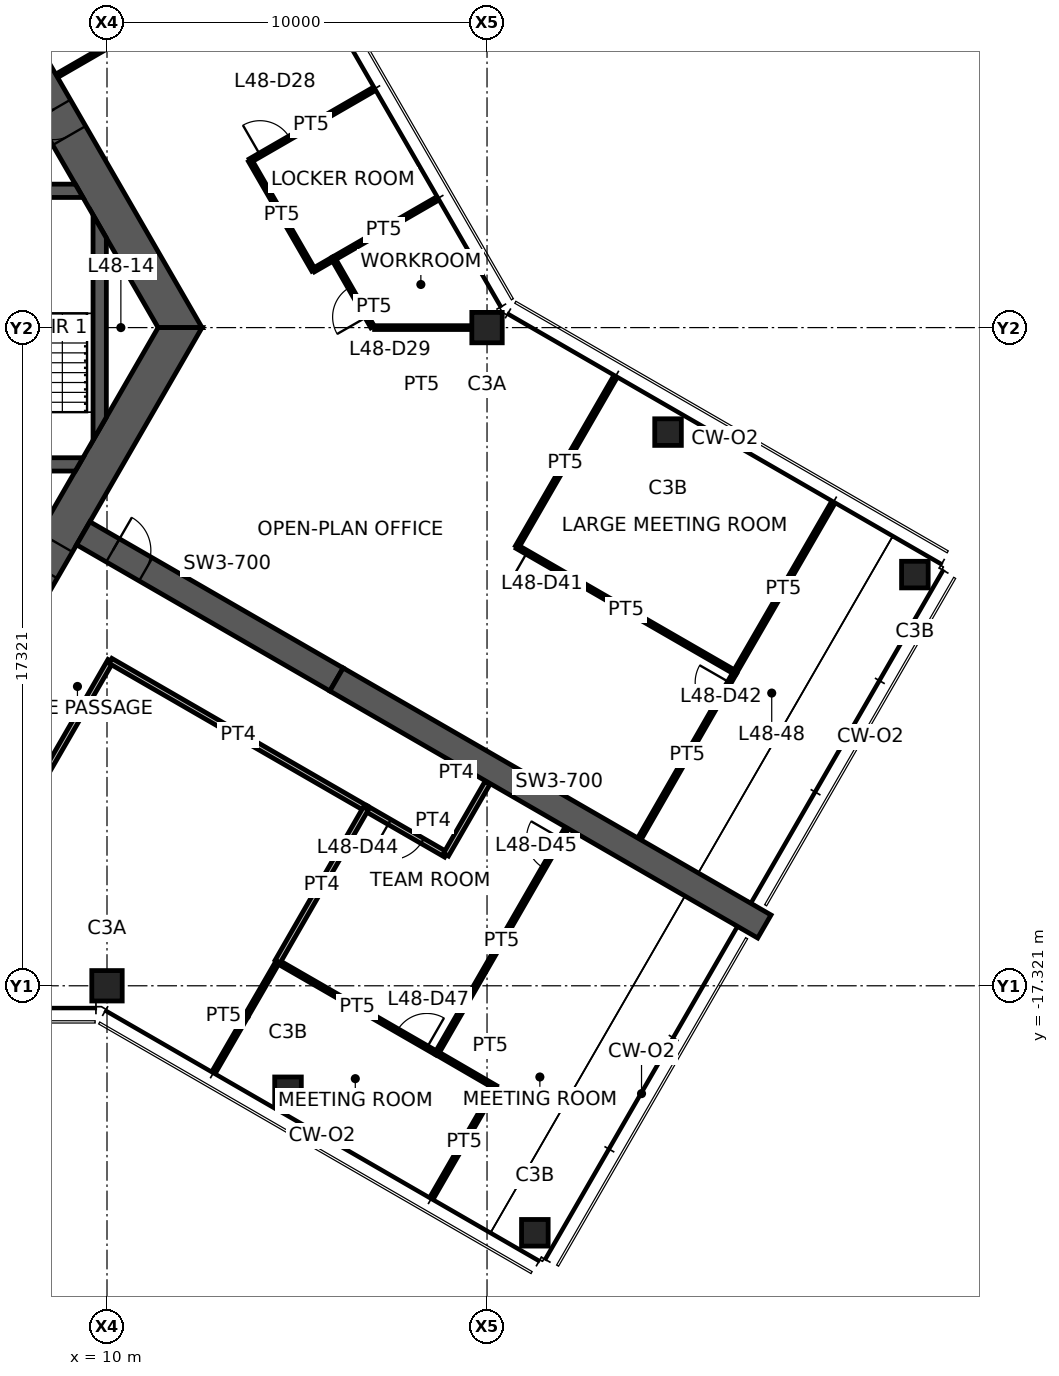
"""IFC4 building model, lengths in metres.
Left out: names, types, materials, properties, quantities, classifications, styles, units other than length and angle.
Written with IfcOpenShell. Run it as: python <this file> out.ifc"""

import sys

from ifc_helpers import new_model, si_unit, direction, frame, frame_2d, origin, origin_2d, place, context, subcontext, project, spatial, polyline, rectangle, hollow_rectangle, outline, extrude, element, fill, save


model = new_model("IFC4")
c1 = context("Model", 3, precision=1e-05, world=origin(), true_north=direction((0.0, 1.0)))
c2 = subcontext(c1, "Body", "Model", "MODEL_VIEW")
j1 = project(units=[si_unit("LENGTHUNIT", "METRE"), si_unit("PLANEANGLEUNIT", "RADIAN")], contexts=[c1])
p1 = place(None, origin())
s1 = spatial("IfcSite", under=j1, at=p1, CompositionType="ELEMENT")
p2 = place(p1, origin())
s2 = spatial("IfcBuilding", under=s1, at=p2, CompositionType="ELEMENT")
p3 = place(p2, frame((0.0, 0.0, 191.6)))
s3 = spatial("IfcBuildingStorey", under=s2, at=p3, CompositionType="ELEMENT", Elevation=191.6)
for number, where, z_axis, x_axis in (
    (1, (20.0, 0.0, 0.0), (0.0, 0.0, 1.0), (1.0, 0.0, 0.0)),
    (2, (10.0, -17.321, 0.0), (0.0, 0.0, 1.0), (1.0, 0.0, 0.0)),
):
    element("IfcColumn", number, at=place(p3, frame(where, z_axis=z_axis, x_axis=x_axis)), inside=s3, PredefinedType="COLUMN", context=c2, shape_type="SweptSolid", body=[
        extrude(hollow_rectangle(XDim=0.8, YDim=0.8, WallThickness=0.045, at=origin_2d()), origin(), (0.0, 0.0, 1.0), 3.9),
    ])
for number, where, z_axis, x_axis in (
    (3, (14.763, -20.071, 0.0), (0.0, 0.0, 1.0), (1.0, 0.0, 0.0)),
    (4, (21.258, -23.821, 0.0), (0.0, 0.0, 1.0), (1.0, 0.0, 0.0)),
    (5, (24.763, -2.75, 0.0), (0.0, 0.0, 1.0), (1.0, 0.0, 0.0)),
    (6, (31.258, -6.5, 0.0), (0.0, 0.0, 1.0), (1.0, 0.0, 0.0)),
):
    element("IfcColumn", number, at=place(p3, frame(where, z_axis=z_axis, x_axis=x_axis)), inside=s3, PredefinedType="COLUMN", context=c2, shape_type="SweptSolid", body=[
        extrude(hollow_rectangle(XDim=0.7, YDim=0.7, WallThickness=0.036, at=origin_2d()), origin(), (0.0, 0.0, 1.0), 3.9),
    ])
p4 = place(p3, frame((11.922, 0.0, 0.0), z_axis=(0.0, 0.0, 1.0), x_axis=(-0.500004296715, 0.866022923061, 0.0)))
e7 = element("IfcWall", 7, at=p4, inside=s3, PredefinedType="SHEAR", context=c2, shape_type="SweptSolid", body=[
    extrude(outline(polyline([(-0.289, -0.5), (5.835, -0.5), (6.635, -0.5), (12.211, -0.5), (11.634, 0.5), (6.635, 0.5), (5.835, 0.5), (0.289, 0.5), (-0.289, -0.5)])), origin(), (0.0, 0.0, 1.0), 3.9),
])
p5 = place(p4, frame((5.835, 0.0, 0.0)))
e8 = element("IfcOpeningElement", 8, at=p5, cuts=e7, PredefinedType="OPENING", context=c2, shape_type="SweptSolid", body=[
    extrude(rectangle(XDim=0.8, YDim=2.1, at=frame_2d((0.4, 1.05))), frame((0.0, 0.51, 0.0), z_axis=(0.0, -1.0, 0.0), x_axis=(1.0, 0.0, 0.0)), (0.0, 0.0, 1.0), 1.02),
])
p6 = place(p3, frame((5.961, -10.325, 0.0), z_axis=(0.0, 0.0, 1.0), x_axis=(0.500004296715, 0.866022923061, 0.0)))
e9 = element("IfcWall", 9, at=p6, inside=s3, PredefinedType="SHEAR", context=c2, shape_type="SweptSolid", body=[
    extrude(outline(polyline([(-0.289, -0.5), (4.594, -0.5), (5.394, -0.5), (12.211, -0.5), (11.634, 0.5), (5.394, 0.5), (4.594, 0.5), (0.289, 0.5), (-0.289, -0.5)])), origin(), (0.0, 0.0, 1.0), 3.9),
])
p7 = place(p6, frame((4.594, 0.0, 0.0)))
e10 = element("IfcOpeningElement", 10, at=p7, cuts=e9, PredefinedType="OPENING", context=c2, shape_type="SweptSolid", body=[
    extrude(rectangle(XDim=0.8, YDim=2.1, at=frame_2d((0.4, 1.05))), frame((0.0, 0.51, 0.0), z_axis=(0.0, -1.0, 0.0), x_axis=(1.0, 0.0, 0.0)), (0.0, 0.0, 1.0), 1.02),
])
p8 = place(p3, frame((9.375, -5.413, 0.0), z_axis=(0.0, 0.0, 1.0), x_axis=(0.866032377459, -0.499987921047, 0.0)))
e11 = element("IfcWall", 11, at=p8, inside=s3, PredefinedType="SHEAR", context=c2, shape_type="SweptSolid", body=[
    extrude(rectangle(XDim=7.696, YDim=0.7, at=frame_2d((3.848, 0.0))), origin(), (0.0, 0.0, 1.0), 3.9),
])
p9 = place(p8, frame((0.9, 0.0, 0.0)))
e12 = element("IfcOpeningElement", 12, at=p9, cuts=e11, PredefinedType="OPENING", context=c2, shape_type="SweptSolid", body=[
    extrude(rectangle(XDim=1.0, YDim=2.1, at=frame_2d((0.5, 1.05))), frame((0.0, 0.36, 0.0), z_axis=(0.0, -1.0, 0.0), x_axis=(1.0, 0.0, 0.0)), (0.0, 0.0, 1.0), 0.72),
])
p10 = place(p3, frame((16.039, -9.26, 0.0), z_axis=(0.0, 0.0, 1.0), x_axis=(0.866024837091, -0.50000098154, 0.0)))
e13 = element("IfcWall", 13, at=p10, inside=s3, PredefinedType="SHEAR", context=c2, shape_type="SweptSolid", body=[
    extrude(rectangle(XDim=13.0, YDim=0.7, at=frame_2d((6.5, 0.0))), origin(), (0.0, 0.0, 1.0), 3.9),
])
p11 = place(p3, frame((1.425, 3.6, 0.0), z_axis=(0.0, 0.0, 1.0), x_axis=(1.0, 0.0, 0.0)))
e14 = element("IfcWall", 14, at=p11, inside=s3, PredefinedType="SHEAR", context=c2, shape_type="SweptSolid", body=[
    extrude(outline(polyline([(0.0, -0.175), (3.425, -0.175), (4.725, -0.175), (7.942, -0.175), (7.74, 0.175), (4.725, 0.175), (3.425, 0.175), (0.0, 0.175), (0.0, -0.175)])), origin(), (0.0, 0.0, 1.0), 3.9),
])
p12 = place(p11, frame((3.425, 0.0, 0.0)))
e15 = element("IfcOpeningElement", 15, at=p12, cuts=e14, PredefinedType="OPENING", context=c2, shape_type="SweptSolid", body=[
    extrude(rectangle(XDim=1.3, YDim=2.1, at=frame_2d((0.65, 1.05))), frame((0.0, 0.185, 0.0), z_axis=(0.0, -1.0, 0.0), x_axis=(1.0, 0.0, 0.0)), (0.0, 0.0, 1.0), 0.37),
])
p13 = place(p3, frame((1.425, -3.6, 0.0), z_axis=(0.0, 0.0, 1.0), x_axis=(1.0, 0.0, 0.0)))
e16 = element("IfcWall", 16, at=p13, inside=s3, PredefinedType="SHEAR", context=c2, shape_type="SweptSolid", body=[
    extrude(outline(polyline([(0.0, -0.175), (1.075, -0.175), (2.175, -0.175), (7.74, -0.175), (7.942, 0.175), (2.175, 0.175), (1.075, 0.175), (0.0, 0.175), (0.0, -0.175)])), origin(), (0.0, 0.0, 1.0), 3.9),
])
p14 = place(p13, frame((1.075, 0.0, 0.0)))
e17 = element("IfcOpeningElement", 17, at=p14, cuts=e16, PredefinedType="OPENING", context=c2, shape_type="SweptSolid", body=[
    extrude(rectangle(XDim=1.1, YDim=2.1, at=frame_2d((0.55, 1.05))), frame((0.0, 0.185, 0.0), z_axis=(0.0, -1.0, 0.0), x_axis=(1.0, 0.0, 0.0)), (0.0, 0.0, 1.0), 0.37),
])
p15 = place(p3, frame((9.808, -2.662, 0.0), z_axis=(0.0, 0.0, 1.0), x_axis=(0.0, 1.0, 0.0)))
e18 = element("IfcWall", 18, at=p15, inside=s3, PredefinedType="SHEAR", context=c2, shape_type="SweptSolid", body=[
    extrude(outline(polyline([(0.303, -0.175), (5.021, -0.175), (5.628, 0.175), (-0.303, 0.175), (0.303, -0.175)])), origin(), (0.0, 0.0, 1.0), 3.9),
])
p16 = place(p3, frame((11.1, 8.025, 0.0), z_axis=(0.0, 0.0, 1.0), x_axis=(-0.866056901187, -0.49994544093, 0.0)))
e19 = element("IfcWall", 19, at=p16, inside=s3, PredefinedType="PARTITIONING", context=c2, shape_type="SweptSolid", body=[
    extrude(rectangle(XDim=2.78, YDim=0.1, at=frame_2d((1.39, 0.0))), origin(), (0.0, 0.0, 1.0), 2.95),
])
p17 = place(p3, frame((18.62, 3.351, 0.0), z_axis=(0.0, 0.0, 1.0), x_axis=(-0.866043267704, -0.499969057507, 0.0)))
e20 = element("IfcWall", 20, at=p17, inside=s3, PredefinedType="PARTITIONING", context=c2, shape_type="SweptSolid", body=[
    extrude(rectangle(XDim=3.085, YDim=0.1, at=frame_2d((1.542, 0.0))), origin(), (0.0, 0.0, 1.0), 2.95),
])
p18 = place(p3, frame((13.767, 4.395, 0.0), z_axis=(0.0, 0.0, 1.0), x_axis=(0.866028673236, 0.499994337101, 0.0)))
e21 = element("IfcWall", 21, at=p18, inside=s3, PredefinedType="PARTITIONING", context=c2, shape_type="SweptSolid", body=[
    extrude(rectangle(XDim=3.705, YDim=0.1, at=frame_2d((1.853, 0.0))), origin(), (0.0, 0.0, 1.0), 2.95),
])
p19 = place(p18, frame((0.3, 0.0, 0.0)))
e22 = element("IfcOpeningElement", 22, at=p19, cuts=e21, PredefinedType="OPENING", context=c2, shape_type="SweptSolid", body=[
    extrude(rectangle(XDim=0.9, YDim=2.1, at=frame_2d((0.45, 1.05))), frame((0.0, 0.06, 0.0), z_axis=(0.0, -1.0, 0.0), x_axis=(1.0, 0.0, 0.0)), (0.0, 0.0, 1.0), 0.12),
])
p20 = place(p3, frame((15.433, 1.51, 0.0), z_axis=(0.0, 0.0, 1.0), x_axis=(-0.500001606164, 0.866024476463, 0.0)))
e23 = element("IfcWall", 23, at=p20, inside=s3, PredefinedType="PARTITIONING", context=c2, shape_type="SweptSolid", body=[
    extrude(rectangle(XDim=3.331, YDim=0.1, at=frame_2d((1.666, 0.0))), origin(), (0.0, 0.0, 1.0), 2.95),
])
p21 = place(p3, frame((15.956, 1.813, 0.0), z_axis=(0.0, 0.0, 1.0), x_axis=(-0.865997239347, -0.500048779063, 0.0)))
e24 = element("IfcWall", 24, at=p21, inside=s3, PredefinedType="PARTITIONING", context=c2, shape_type="SweptSolid", body=[
    extrude(rectangle(XDim=0.604, YDim=0.1, at=frame_2d((0.302, 0.0))), origin(), (0.0, 0.0, 1.0), 2.95),
])
p22 = place(p3, frame((16.986, 0.02, 0.0), z_axis=(0.0, 0.0, 1.0), x_axis=(-0.498096123952, 0.867121820337, 0.0)))
e25 = element("IfcWall", 25, at=p22, inside=s3, PredefinedType="PARTITIONING", context=c2, shape_type="SweptSolid", body=[
    extrude(rectangle(XDim=2.067, YDim=0.1, at=frame_2d((1.034, 0.0))), origin(), (0.0, 0.0, 1.0), 2.95),
])
p23 = place(p22, frame((0.3, 0.0, 0.0)))
e26 = element("IfcOpeningElement", 26, at=p23, cuts=e25, PredefinedType="OPENING", context=c2, shape_type="SweptSolid", body=[
    extrude(rectangle(XDim=0.9, YDim=2.1, at=frame_2d((0.45, 1.05))), frame((0.0, 0.06, 0.0), z_axis=(0.0, -1.0, 0.0), x_axis=(1.0, 0.0, 0.0)), (0.0, 0.0, 1.0), 0.12),
])
p24 = place(p3, frame((29.077, -4.658, 0.0), z_axis=(0.0, 0.0, 1.0), x_axis=(-0.500900533712, -0.86550485575, 0.0)))
e27 = element("IfcWall", 27, at=p24, inside=s3, PredefinedType="PARTITIONING", context=c2, shape_type="SweptSolid", body=[
    extrude(rectangle(XDim=5.105, YDim=0.1, at=frame_2d((2.552, 0.0))), origin(), (0.0, 0.0, 1.0), 2.95),
])
p25 = place(p3, frame((20.792, -5.769, 0.0), z_axis=(0.0, 0.0, 1.0), x_axis=(0.500005339912, 0.866022320763, 0.0)))
e28 = element("IfcWall", 28, at=p25, inside=s3, PredefinedType="PARTITIONING", context=c2, shape_type="SweptSolid", body=[
    extrude(rectangle(XDim=5.08, YDim=0.1, at=frame_2d((2.54, 0.0))), origin(), (0.0, 0.0, 1.0), 2.95),
])
p26 = place(p3, frame((26.527, -9.075, 0.0), z_axis=(0.0, 0.0, 1.0), x_axis=(-0.866343956507, 0.499447844147, 0.0)))
e29 = element("IfcWall", 29, at=p26, inside=s3, PredefinedType="PARTITIONING", context=c2, shape_type="SweptSolid", body=[
    extrude(rectangle(XDim=6.62, YDim=0.1, at=frame_2d((3.31, 0.0))), origin(), (0.0, 0.0, 1.0), 2.95),
])
p27 = place(p26, frame((5.42, 0.0, 0.0)))
e30 = element("IfcOpeningElement", 30, at=p27, cuts=e29, PredefinedType="OPENING", context=c2, shape_type="SweptSolid", body=[
    extrude(rectangle(XDim=0.9, YDim=2.1, at=frame_2d((0.45, 1.05))), frame((0.0, 0.06, 0.0), z_axis=(0.0, -1.0, 0.0), x_axis=(1.0, 0.0, 0.0)), (0.0, 0.0, 1.0), 0.12),
])
p28 = place(p3, frame((24.018, -13.439, 0.0), z_axis=(0.0, 0.0, 1.0), x_axis=(0.498430118894, 0.866929879851, 0.0)))
e31 = element("IfcWall", 31, at=p28, inside=s3, PredefinedType="PARTITIONING", context=c2, shape_type="SweptSolid", body=[
    extrude(rectangle(XDim=5.034, YDim=0.1, at=frame_2d((2.517, 0.0))), origin(), (0.0, 0.0, 1.0), 2.95),
])
p29 = place(p28, frame((3.834, 0.0, 0.0)))
e32 = element("IfcOpeningElement", 32, at=p29, cuts=e31, PredefinedType="OPENING", context=c2, shape_type="SweptSolid", body=[
    extrude(rectangle(XDim=0.9, YDim=2.1, at=frame_2d((0.45, 1.05))), frame((0.0, 0.06, 0.0), z_axis=(0.0, -1.0, 0.0), x_axis=(1.0, 0.0, 0.0)), (0.0, 0.0, 1.0), 0.12),
])
p30 = place(p3, frame((10.092, -8.771, 0.0), z_axis=(0.0, 0.0, 1.0), x_axis=(-0.500019495363, -0.866014147839, 0.0)))
e33 = element("IfcWall", 33, at=p30, inside=s3, PredefinedType="PARTITIONING", context=c2, shape_type="SweptSolid", body=[
    extrude(rectangle(XDim=5.028, YDim=0.15, at=frame_2d((2.514, 0.0))), origin(), (0.0, 0.0, 1.0), 2.95),
])
p31 = place(p3, frame((16.822, -12.656, 0.0), z_axis=(0.0, 0.0, 1.0), x_axis=(-0.866028634939, 0.499994403434, 0.0)))
e34 = element("IfcWall", 34, at=p31, inside=s3, PredefinedType="PARTITIONING", context=c2, shape_type="SweptSolid", body=[
    extrude(rectangle(XDim=7.771, YDim=0.15, at=frame_2d((3.885, 0.0))), origin(), (0.0, 0.0, 1.0), 2.95),
])
p32 = place(p3, frame((18.921, -13.869, 0.0), z_axis=(0.0, 0.0, 1.0), x_axis=(-0.866000196749, 0.500043657324, 0.0)))
e35 = element("IfcWall", 35, at=p32, inside=s3, PredefinedType="PARTITIONING", context=c2, shape_type="SweptSolid", body=[
    extrude(rectangle(XDim=2.434, YDim=0.15, at=frame_2d((1.217, 0.0))), origin(), (0.0, 0.0, 1.0), 2.95),
])
p33 = place(p32, frame((0.717, 0.0, 0.0)))
e36 = element("IfcOpeningElement", 36, at=p33, cuts=e35, PredefinedType="OPENING", context=c2, shape_type="SweptSolid", body=[
    extrude(rectangle(XDim=1.0, YDim=2.1, at=frame_2d((0.5, 1.05))), frame((0.0, 0.085, 0.0), z_axis=(0.0, -1.0, 0.0), x_axis=(1.0, 0.0, 0.0)), (0.0, 0.0, 1.0), 0.17),
])
p34 = place(p3, frame((20.011, -11.981, 0.0), z_axis=(0.0, 0.0, 1.0), x_axis=(-0.500029427677, -0.866008413041, 0.0)))
e37 = element("IfcWall", 37, at=p34, inside=s3, PredefinedType="PARTITIONING", context=c2, shape_type="SweptSolid", body=[
    extrude(rectangle(XDim=2.18, YDim=0.15, at=frame_2d((1.09, 0.0))), origin(), (0.0, 0.0, 1.0), 2.95),
])
p35 = place(p3, frame((18.573, -22.853, 0.0), z_axis=(0.0, 0.0, 1.0), x_axis=(0.499920671713, 0.866071199148, 0.0)))
e38 = element("IfcWall", 38, at=p35, inside=s3, PredefinedType="PARTITIONING", context=c2, shape_type="SweptSolid", body=[
    extrude(rectangle(XDim=3.305, YDim=0.1, at=frame_2d((1.653, 0.0))), origin(), (0.0, 0.0, 1.0), 2.95),
])
p36 = place(p3, frame((20.225, -19.991, 0.0), z_axis=(0.0, 0.0, 1.0), x_axis=(-0.864647633554, 0.502378811047, 0.0)))
e39 = element("IfcWall", 39, at=p36, inside=s3, PredefinedType="PARTITIONING", context=c2, shape_type="SweptSolid", body=[
    extrude(rectangle(XDim=1.791, YDim=0.1, at=frame_2d((0.896, 0.0))), origin(), (0.0, 0.0, 1.0), 2.95),
])
p37 = place(p3, frame((18.678, -19.097, 0.0), z_axis=(0.0, 0.0, 1.0), x_axis=(0.499488276661, 0.86632064588, 0.0)))
e40 = element("IfcWall", 40, at=p37, inside=s3, PredefinedType="PARTITIONING", context=c2, shape_type="SweptSolid", body=[
    extrude(rectangle(XDim=6.83, YDim=0.1, at=frame_2d((3.415, 0.0))), origin(), (0.0, 0.0, 1.0), 2.95),
])
p38 = place(p37, frame((5.63, 0.0, 0.0)))
e41 = element("IfcOpeningElement", 41, at=p38, cuts=e40, PredefinedType="OPENING", context=c2, shape_type="SweptSolid", body=[
    extrude(rectangle(XDim=0.9, YDim=2.1, at=frame_2d((0.45, 1.05))), frame((0.0, 0.06, 0.0), z_axis=(0.0, -1.0, 0.0), x_axis=(1.0, 0.0, 0.0)), (0.0, 0.0, 1.0), 0.12),
])
p39 = place(p3, frame((12.84, -19.543, 0.0), z_axis=(0.0, 0.0, 1.0), x_axis=(0.501269197563, 0.865291391136, 0.0)))
e42 = element("IfcWall", 42, at=p39, inside=s3, PredefinedType="PARTITIONING", context=c2, shape_type="SweptSolid", body=[
    extrude(rectangle(XDim=3.305, YDim=0.1, at=frame_2d((1.653, 0.0))), origin(), (0.0, 0.0, 1.0), 2.95),
])
p40 = place(p3, frame((14.49, -16.685, 0.0), z_axis=(0.0, 0.0, 1.0), x_axis=(0.866481441777, -0.499209285827, 0.0)))
e43 = element("IfcWall", 43, at=p40, inside=s3, PredefinedType="PARTITIONING", context=c2, shape_type="SweptSolid", body=[
    extrude(rectangle(XDim=4.833, YDim=0.1, at=frame_2d((2.417, 0.0))), origin(), (0.0, 0.0, 1.0), 2.95),
])
p41 = place(p40, frame((3.633, 0.0, 0.0)))
e44 = element("IfcOpeningElement", 44, at=p41, cuts=e43, PredefinedType="OPENING", context=c2, shape_type="SweptSolid", body=[
    extrude(rectangle(XDim=0.9, YDim=2.1, at=frame_2d((0.45, 1.05))), frame((0.0, 0.06, 0.0), z_axis=(0.0, -1.0, 0.0), x_axis=(1.0, 0.0, 0.0)), (0.0, 0.0, 1.0), 0.12),
])
p42 = place(p3, frame((16.812, -12.652, 0.0), z_axis=(0.0, 0.0, 1.0), x_axis=(-0.499085020987, -0.86655302309, 0.0)))
e45 = element("IfcWall", 45, at=p42, inside=s3, PredefinedType="PARTITIONING", context=c2, shape_type="SweptSolid", body=[
    extrude(rectangle(XDim=4.654, YDim=0.15, at=frame_2d((2.327, 0.0))), origin(), (0.0, 0.0, 1.0), 2.95),
])
p43 = place(p3, frame((19.519, 0.0, 0.0), z_axis=(0.0, 0.0, 1.0), x_axis=(-1.0, 0.0, 0.0)))
e46 = element("IfcWall", 46, at=p43, inside=s3, PredefinedType="PARTITIONING", context=c2, shape_type="SweptSolid", body=[
    extrude(rectangle(XDim=2.478, YDim=0.1, at=frame_2d((1.239, 0.0))), origin(), (0.0, 0.0, 1.0), 2.95),
])
p44 = place(p5, origin())
e47 = element("IfcDoor", 47, at=p44, inside=s3, OperationType="SINGLE_SWING_RIGHT", PredefinedType="DOOR", context=c2, shape_type="SweptSolid", body=[
    extrude(rectangle(XDim=0.8, YDim=2.1, at=frame_2d((0.4, 1.05))), frame((0.0, 0.025, 0.0), z_axis=(0.0, -1.0, 0.0), x_axis=(1.0, 0.0, 0.0)), (0.0, 0.0, 1.0), 0.05),
])
fill(e8, e47)
p45 = place(p7, origin())
e48 = element("IfcDoor", 48, at=p45, inside=s3, OperationType="SINGLE_SWING_LEFT", PredefinedType="DOOR", context=c2, shape_type="SweptSolid", body=[
    extrude(rectangle(XDim=0.8, YDim=2.1, at=frame_2d((0.4, 1.05))), frame((0.0, 0.025, 0.0), z_axis=(0.0, -1.0, 0.0), x_axis=(1.0, 0.0, 0.0)), (0.0, 0.0, 1.0), 0.05),
])
fill(e10, e48)
p46 = place(p9, origin())
e49 = element("IfcDoor", 49, at=p46, inside=s3, OperationType="SINGLE_SWING_LEFT", PredefinedType="DOOR", context=c2, shape_type="SweptSolid", body=[
    extrude(rectangle(XDim=1.0, YDim=2.1, at=frame_2d((0.5, 1.05))), frame((0.0, 0.025, 0.0), z_axis=(0.0, -1.0, 0.0), x_axis=(1.0, 0.0, 0.0)), (0.0, 0.0, 1.0), 0.05),
])
fill(e12, e49)
p47 = place(p19, origin())
e50 = element("IfcDoor", 50, at=p47, inside=s3, OperationType="SINGLE_SWING_LEFT", PredefinedType="DOOR", context=c2, shape_type="SweptSolid", body=[
    extrude(rectangle(XDim=0.9, YDim=2.1, at=frame_2d((0.45, 1.05))), frame((0.0, 0.025, 0.0), z_axis=(0.0, -1.0, 0.0), x_axis=(1.0, 0.0, 0.0)), (0.0, 0.0, 1.0), 0.05),
])
fill(e22, e50)
p48 = place(p23, origin())
e51 = element("IfcDoor", 51, at=p48, inside=s3, OperationType="SINGLE_SWING_LEFT", PredefinedType="DOOR", context=c2, shape_type="SweptSolid", body=[
    extrude(rectangle(XDim=0.9, YDim=2.1, at=frame_2d((0.45, 1.05))), frame((0.0, 0.025, 0.0), z_axis=(0.0, -1.0, 0.0), x_axis=(1.0, 0.0, 0.0)), (0.0, 0.0, 1.0), 0.05),
])
fill(e26, e51)
p49 = place(p27, origin())
e52 = element("IfcDoor", 52, at=p49, inside=s3, OperationType="SINGLE_SWING_RIGHT", PredefinedType="DOOR", context=c2, shape_type="SweptSolid", body=[
    extrude(rectangle(XDim=0.9, YDim=2.1, at=frame_2d((0.45, 1.05))), frame((0.0, 0.025, 0.0), z_axis=(0.0, -1.0, 0.0), x_axis=(1.0, 0.0, 0.0)), (0.0, 0.0, 1.0), 0.05),
])
fill(e30, e52)
p50 = place(p29, origin())
e53 = element("IfcDoor", 53, at=p50, inside=s3, OperationType="SINGLE_SWING_RIGHT", PredefinedType="DOOR", context=c2, shape_type="SweptSolid", body=[
    extrude(rectangle(XDim=0.9, YDim=2.1, at=frame_2d((0.45, 1.05))), frame((0.0, 0.025, 0.0), z_axis=(0.0, -1.0, 0.0), x_axis=(1.0, 0.0, 0.0)), (0.0, 0.0, 1.0), 0.05),
])
fill(e32, e53)
p51 = place(p33, origin())
e54 = element("IfcDoor", 54, at=p51, inside=s3, OperationType="SINGLE_SWING_RIGHT", PredefinedType="DOOR", context=c2, shape_type="SweptSolid", body=[
    extrude(rectangle(XDim=1.0, YDim=2.1, at=frame_2d((0.5, 1.05))), frame((0.0, 0.025, 0.0), z_axis=(0.0, -1.0, 0.0), x_axis=(1.0, 0.0, 0.0)), (0.0, 0.0, 1.0), 0.05),
])
fill(e36, e54)
p52 = place(p38, origin())
e55 = element("IfcDoor", 55, at=p52, inside=s3, OperationType="SINGLE_SWING_RIGHT", PredefinedType="DOOR", context=c2, shape_type="SweptSolid", body=[
    extrude(rectangle(XDim=0.9, YDim=2.1, at=frame_2d((0.45, 1.05))), frame((0.0, 0.025, 0.0), z_axis=(0.0, -1.0, 0.0), x_axis=(1.0, 0.0, 0.0)), (0.0, 0.0, 1.0), 0.05),
])
fill(e41, e55)
p53 = place(p41, origin())
e56 = element("IfcDoor", 56, at=p53, inside=s3, OperationType="SINGLE_SWING_RIGHT", PredefinedType="DOOR", context=c2, shape_type="SweptSolid", body=[
    extrude(rectangle(XDim=0.9, YDim=2.1, at=frame_2d((0.45, 1.05))), frame((0.0, 0.025, 0.0), z_axis=(0.0, -1.0, 0.0), x_axis=(1.0, 0.0, 0.0)), (0.0, 0.0, 1.0), 0.05),
])
fill(e44, e56)
save(model, sys.argv[1])
